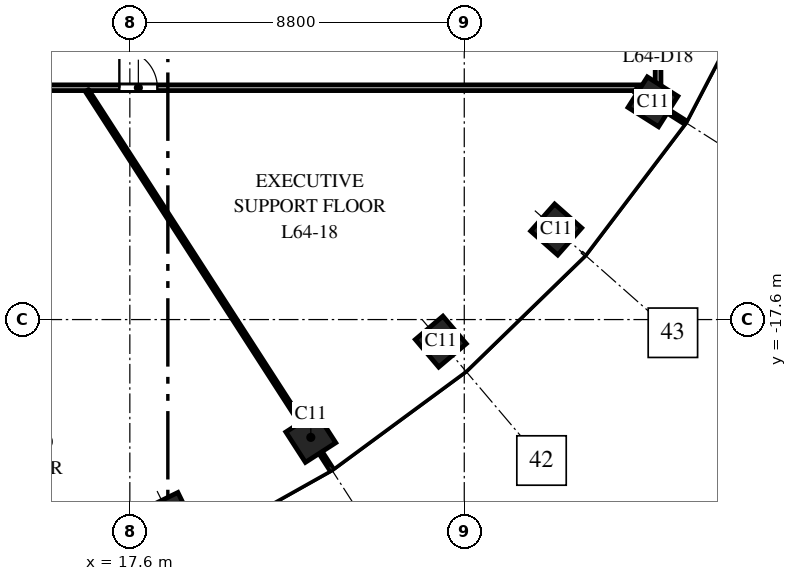
"""IFC4 building model, lengths in metres.
Left out: names, types, materials, properties, quantities, classifications, styles, units other than length and angle.
Written with IfcOpenShell. Run it as: python <this file> out.ifc"""

import sys

from ifc_helpers import new_model, si_unit, direction, frame, frame_2d, origin, origin_2d, place, context, subcontext, project, spatial, rectangle, extrude, element, fill, save


model = new_model("IFC4")
c1 = context("Model", 3, precision=1e-05, world=origin(), true_north=direction((0.0, 1.0)))
c2 = subcontext(c1, "Body", "Model", "MODEL_VIEW")
j1 = project(units=[si_unit("LENGTHUNIT", "METRE"), si_unit("PLANEANGLEUNIT", "RADIAN")], contexts=[c1])
p1 = place(None, origin())
s1 = spatial("IfcSite", under=j1, at=p1, CompositionType="ELEMENT")
p2 = place(p1, origin())
s2 = spatial("IfcBuilding", under=s1, at=p2, CompositionType="ELEMENT")
p3 = place(p2, frame((0.0, 0.0, 299.0)))
s3 = spatial("IfcBuildingStorey", under=s2, at=p3, CompositionType="ELEMENT", Elevation=299.0)
for number, where, z_axis, x_axis in (
    (1, (18.646, -22.785, 0.0), (0.0, 0.0, 1.0), (0.898, 0.439, 0.0)),
    (2, (22.362, -20.7, 0.0), (0.0, 0.0, 1.0), (0.84, 0.542, 0.0)),
    (3, (25.783, -18.18, 0.0), (0.0, 0.0, 1.0), (0.763, 0.646, 0.0)),
    (4, (28.819, -15.23, 0.0), (0.0, 0.0, 1.0), (0.663, 0.749, 0.0)),
    (5, (31.365, -11.871, 0.0), (0.0, 0.0, 1.0), (0.535, 0.845, 0.0)),
):
    element("IfcColumn", number, at=place(p3, frame(where, z_axis=z_axis, x_axis=x_axis)), inside=s3, PredefinedType="COLUMN", context=c2, shape_type="SweptSolid", body=[
        extrude(rectangle(XDim=0.95, YDim=0.95, at=origin_2d()), origin(), (0.0, 0.0, 1.0), 4.0),
    ])
p4 = place(p3, frame((7.129, -11.5, 0.0), z_axis=(0.0, 0.0, 1.0), x_axis=(1.0, 0.0, 0.0)))
e6 = element("IfcWall", 6, at=p4, inside=s3, PredefinedType="PARTITIONING", context=c2, shape_type="SweptSolid", body=[
    extrude(rectangle(XDim=24.371, YDim=0.15, at=frame_2d((12.186, 0.0))), origin(), (0.0, 0.0, 1.0), 2.75),
])
p5 = place(p4, frame((0.633, 0.0, 0.0)))
e7 = element("IfcOpeningElement", 7, at=p5, cuts=e6, PredefinedType="OPENING", context=c2, shape_type="SweptSolid", body=[
    extrude(rectangle(XDim=1.0, YDim=2.1, at=frame_2d((0.5, 1.05))), frame((0.0, 0.085, 0.0), z_axis=(0.0, -1.0, 0.0), x_axis=(1.0, 0.0, 0.0)), (0.0, 0.0, 1.0), 0.17),
])
p6 = place(p4, frame((10.195, 0.0, 0.0)))
e8 = element("IfcOpeningElement", 8, at=p6, cuts=e6, PredefinedType="OPENING", context=c2, shape_type="SweptSolid", body=[
    extrude(rectangle(XDim=1.0, YDim=2.1, at=frame_2d((0.5, 1.05))), frame((0.0, 0.085, 0.0), z_axis=(0.0, -1.0, 0.0), x_axis=(1.0, 0.0, 0.0)), (0.0, 0.0, 1.0), 0.17),
])
p7 = place(p3, frame((16.472, -11.575, 0.0), z_axis=(0.0, 0.0, 1.0), x_axis=(0.54229092728, -0.840190782019, 0.0)))
e9 = element("IfcWall", 9, at=p7, inside=s3, PredefinedType="PARTITIONING", context=c2, shape_type="SweptSolid", body=[
    extrude(rectangle(XDim=11.863, YDim=0.1, at=frame_2d((5.931, 0.0))), origin(), (0.0, 0.0, 1.0), 3.7),
])
p8 = place(p3, frame((30.897, -11.575, 0.0), z_axis=(0.0, 0.0, 1.0), x_axis=(0.844757626245, -0.535149094086, 0.0)))
e10 = element("IfcWall", 10, at=p8, inside=s3, PredefinedType="PARTITIONING", context=c2, shape_type="SweptSolid", body=[
    extrude(rectangle(XDim=1.557, YDim=0.1, at=frame_2d((0.778, 0.0))), origin(), (0.0, 0.0, 1.0), 3.0),
])
p9 = place(p3, frame((31.5, -11.5, 0.0), z_axis=(0.0, 0.0, 1.0), x_axis=(0.0, 1.0, 0.0)))
e11 = element("IfcWall", 11, at=p9, inside=s3, PredefinedType="PARTITIONING", context=c2, shape_type="SweptSolid", body=[
    extrude(rectangle(XDim=3.0, YDim=0.15, at=frame_2d((1.5, 0.0))), origin(), (0.0, 0.0, 1.0), 3.0),
])
p10 = place(p9, frame((1.4, 0.0, 0.0)))
e12 = element("IfcOpeningElement", 12, at=p10, cuts=e11, PredefinedType="OPENING", context=c2, shape_type="SweptSolid", body=[
    extrude(rectangle(XDim=1.0, YDim=2.1, at=frame_2d((0.5, 1.05))), frame((0.0, 0.085, 0.0), z_axis=(0.0, -1.0, 0.0), x_axis=(1.0, 0.0, 0.0)), (0.0, 0.0, 1.0), 0.17),
])
p11 = place(p6, origin())
e13 = element("IfcDoor", 13, at=p11, inside=s3, OperationType="SINGLE_SWING_LEFT", PredefinedType="DOOR", context=c2, shape_type="SweptSolid", body=[
    extrude(rectangle(XDim=1.0, YDim=2.1, at=frame_2d((0.5, 1.05))), frame((0.0, 0.025, 0.0), z_axis=(0.0, -1.0, 0.0), x_axis=(1.0, 0.0, 0.0)), (0.0, 0.0, 1.0), 0.05),
])
fill(e8, e13)
save(model, sys.argv[1])
